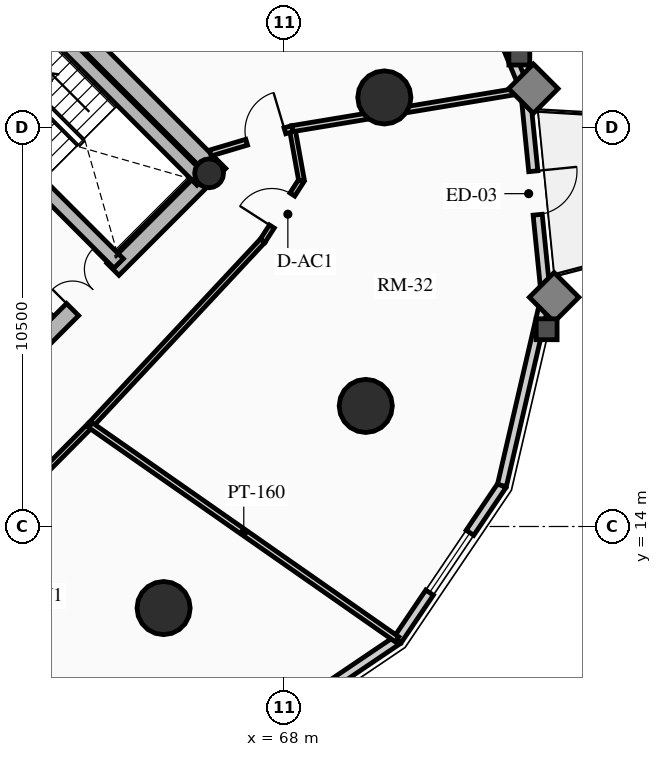
"""IFC4 building model, lengths in metres.
Left out: names, types, materials, properties, quantities, classifications, styles, units other than length and angle.
Written with IfcOpenShell. Run it as: python <this file> out.ifc"""

import sys

from ifc_helpers import new_model, si_unit, direction, frame, frame_2d, origin, origin_2d, place, context, subcontext, project, spatial, rectangle, circle, hollow_circle, extrude, source, transform, mapped, element, fill, save


model = new_model("IFC4")
c1 = context("Model", 3, precision=1e-05, world=origin(), true_north=direction((0.0, 1.0)))
c2 = subcontext(c1, "Body", "Model", "MODEL_VIEW")
j1 = project(units=[si_unit("LENGTHUNIT", "METRE"), si_unit("PLANEANGLEUNIT", "RADIAN")], contexts=[c1])
p1 = place(None, origin())
s1 = spatial("IfcSite", under=j1, at=p1, CompositionType="ELEMENT")
p2 = place(p1, origin())
s2 = spatial("IfcBuilding", under=s1, at=p2, CompositionType="ELEMENT")
p3 = place(p2, frame((0.0, 0.0, 119.62)))
s3 = spatial("IfcBuildingStorey", under=s2, at=p3, CompositionType="ELEMENT", Elevation=119.62)
p4 = place(p3, frame((66.303, 23.263, 0.0), z_axis=(0.0, 0.0, 1.0), x_axis=(-0.707106781187, 0.707106781187, 0.0)))
e1 = element("IfcWall", 1, at=p4, inside=s3, PredefinedType="SHEAR", context=c2, shape_type="SweptSolid", body=[
    extrude(rectangle(XDim=14.2, YDim=0.45, at=frame_2d((7.1, 0.0))), origin(), (0.0, 0.0, 1.0), 2.91),
])
p5 = place(p3, frame((58.578, 15.856, 0.0), z_axis=(0.0, 0.0, 1.0), x_axis=(0.707106781187, 0.707106781187, 0.0)))
e2 = element("IfcWall", 2, at=p5, inside=s3, PredefinedType="SHEAR", context=c2, shape_type="SweptSolid", body=[
    extrude(rectangle(XDim=10.7, YDim=0.45, at=frame_2d((5.35, 0.0))), origin(), (0.0, 0.0, 1.0), 2.91),
])
m1 = source(origin(), c2, "Body", "SweptSolid", [
    extrude(rectangle(XDim=1.5, YDim=2.02, at=frame_2d((0.75, 1.01))), frame((0.0, 0.235, 0.0), z_axis=(0.0, -1.0, 0.0), x_axis=(1.0, 0.0, 0.0)), (0.0, 0.0, 1.0), 0.47),
])
p6 = place(p5, frame((5.45, 0.0, 0.0)))
e3 = element("IfcOpeningElement", 3, at=p6, cuts=e2, PredefinedType="OPENING", context=c2, shape_type="MappedRepresentation", body=[
    mapped(m1, transform((0.0, 0.0, 0.0), x_axis=(1.0, 0.0, 0.0), y_axis=(0.0, 1.0, 0.0), z_axis=(0.0, 0.0, 1.0), scale=1.0)),
])
p7 = place(p3, frame((63.645, 20.922, 0.0), z_axis=(0.0, 0.0, 1.0), x_axis=(-0.707106781187, 0.707106781187, 0.0)))
e4 = element("IfcWall", 4, at=p7, inside=s3, PredefinedType="SHEAR", context=c2, shape_type="SweptSolid", body=[
    extrude(rectangle(XDim=13.75, YDim=0.35, at=frame_2d((6.875, 0.0))), origin(), (0.0, 0.0, 1.0), 2.91),
])
m2 = source(origin(), c2, "Body", "SweptSolid", [
    extrude(rectangle(XDim=1.1, YDim=2.015, at=frame_2d((0.55, 1.007))), frame((0.0, 0.185, 0.0), z_axis=(0.0, -1.0, 0.0), x_axis=(1.0, 0.0, 0.0)), (0.0, 0.0, 1.0), 0.37),
])
p8 = place(p7, frame((10.0, 0.0, 0.0)))
e5 = element("IfcOpeningElement", 5, at=p8, cuts=e4, PredefinedType="OPENING", context=c2, shape_type="MappedRepresentation", body=[
    mapped(m2, transform((0.0, 0.0, 0.0), x_axis=(1.0, 0.0, 0.0), y_axis=(0.0, 1.0, 0.0), z_axis=(0.0, 0.0, 1.0), scale=1.0)),
])
p9 = place(p7, frame((12.0, 0.0, 0.0)))
e6 = element("IfcOpeningElement", 6, at=p9, cuts=e4, PredefinedType="OPENING", context=c2, shape_type="MappedRepresentation", body=[
    mapped(m2, transform((0.0, 0.0, 0.0), x_axis=(1.0, 0.0, 0.0), y_axis=(0.0, 1.0, 0.0), z_axis=(0.0, 0.0, 1.0), scale=1.0)),
])
m3 = source(origin(), c2, "Body", "SweptSolid", [
    extrude(rectangle(XDim=1.15, YDim=2.02, at=frame_2d((0.575, 1.01))), frame((0.0, 0.185, 0.0), z_axis=(0.0, -1.0, 0.0), x_axis=(1.0, 0.0, 0.0)), (0.0, 0.0, 1.0), 0.37),
])
p10 = place(p7, frame((5.305, 0.0, 0.0)))
e7 = element("IfcOpeningElement", 7, at=p10, cuts=e4, PredefinedType="OPENING", context=c2, shape_type="MappedRepresentation", body=[
    mapped(m3, transform((0.0, 0.0, 0.0), x_axis=(1.0, 0.0, 0.0), y_axis=(0.0, 1.0, 0.0), z_axis=(0.0, 0.0, 1.0), scale=1.0)),
])
p11 = place(p3, frame((65.83, 23.107, 0.0), z_axis=(0.0, 0.0, 1.0), x_axis=(-0.707088616009, 0.707124945897, 0.0)))
e8 = element("IfcWall", 8, at=p11, inside=s3, PredefinedType="SHEAR", context=c2, shape_type="SweptSolid", body=[
    extrude(rectangle(XDim=6.72, YDim=0.35, at=frame_2d((3.36, 0.0))), origin(), (0.0, 0.0, 1.0), 2.91),
])
p12 = place(p3, frame((66.024, 23.294, 0.0), z_axis=(0.0, 0.0, 1.0), x_axis=(0.707106781187, 0.707106781187, 0.0)))
e9 = element("IfcColumn", 9, at=p12, inside=s3, PredefinedType="COLUMN", context=c2, shape_type="SweptSolid", body=[
    extrude(hollow_circle(Radius=0.38, WallThickness=0.032, at=origin_2d()), origin(), (0.0, 0.0, 1.0), 2.91),
])
for number, where, z_axis, x_axis in (
    (10, (64.827, 11.854, 0.0), (0.0, 0.0, 1.0), (1.0, 0.0, 0.0)),
    (11, (70.146, 17.173, 0.0), (0.0, 0.0, 1.0), (1.0, 0.0, 0.0)),
    (12, (70.635, 25.291, 0.0), (0.0, 0.0, 1.0), (1.0, 0.0, 0.0)),
):
    element("IfcColumn", number, at=place(p3, frame(where, z_axis=z_axis, x_axis=x_axis)), inside=s3, PredefinedType="USERDEFINED", context=c2, shape_type="SweptSolid", body=[
        extrude(circle(Radius=0.7, at=origin_2d()), origin(), (0.0, 0.0, 1.0), 2.91),
    ])
p13 = place(p3, frame((70.985, 11.015, 0.0), z_axis=(0.0, 0.0, 1.0), x_axis=(-0.828781148131, -0.559572880421, 0.0)))
e13 = element("IfcWall", 13, at=p13, inside=s3, PredefinedType="SOLIDWALL", context=c2, shape_type="SweptSolid", body=[
    extrude(rectangle(XDim=4.905, YDim=0.24, at=frame_2d((2.452, 0.0))), origin(), (0.0, 0.0, 1.0), 2.179),
])
p14 = place(p3, frame((73.729, 15.08, 0.0), z_axis=(0.0, 0.0, 1.0), x_axis=(-0.559572880421, -0.828781148131, 0.0)))
e14 = element("IfcWall", 14, at=p14, inside=s3, PredefinedType="SOLIDWALL", context=c2, shape_type="SweptSolid", body=[
    extrude(rectangle(XDim=4.905, YDim=0.24, at=frame_2d((2.452, 0.0))), origin(), (0.0, 0.0, 1.0), 2.179),
])
m4 = source(origin(), c2, "Body", "SweptSolid", [
    extrude(rectangle(XDim=1.9, YDim=1.35, at=frame_2d((0.95, 0.675))), frame((0.0, 0.13, 0.0), z_axis=(0.0, -1.0, 0.0), x_axis=(1.0, 0.0, 0.0)), (0.0, 0.0, 1.0), 0.26),
])
p15 = place(p14, frame((1.502, 0.0, 0.65)))
e15 = element("IfcOpeningElement", 15, at=p15, cuts=e14, PredefinedType="OPENING", context=c2, shape_type="MappedRepresentation", body=[
    mapped(m4, transform((0.0, 0.0, 0.0), x_axis=(1.0, 0.0, 0.0), y_axis=(0.0, 1.0, 0.0), z_axis=(0.0, 0.0, 1.0), scale=1.0)),
])
p16 = place(p3, frame((74.885, 20.067, 0.0), z_axis=(0.0, 0.0, 1.0), x_axis=(-0.225834725257, -0.974165631126, 0.0)))
e16 = element("IfcWall", 16, at=p16, inside=s3, PredefinedType="SOLIDWALL", context=c2, shape_type="SweptSolid", body=[
    extrude(rectangle(XDim=5.119, YDim=0.24, at=frame_2d((2.56, 0.0))), origin(), (0.0, 0.0, 1.0), 2.179),
])
p17 = place(p3, frame((74.339, 25.487, 0.0), z_axis=(0.0, 0.0, 1.0), x_axis=(0.10015591906, -0.994971754311, 0.0)))
e17 = element("IfcWall", 17, at=p17, inside=s3, PredefinedType="SOLIDWALL", context=c2, shape_type="SweptSolid", body=[
    extrude(rectangle(XDim=5.448, YDim=0.24, at=frame_2d((2.724, 0.0))), origin(), (0.0, 0.0, 1.0), 2.179),
])
m5 = source(origin(), c2, "Body", "SweptSolid", [
    extrude(rectangle(XDim=1.15, YDim=2.005, at=frame_2d((0.575, 1.002))), frame((0.0, 0.13, 0.0), z_axis=(0.0, -1.0, 0.0), x_axis=(1.0, 0.0, 0.0)), (0.0, 0.0, 1.0), 0.26),
])
p18 = place(p17, frame((2.149, 0.0, 0.0)))
e18 = element("IfcOpeningElement", 18, at=p18, cuts=e17, PredefinedType="OPENING", context=c2, shape_type="MappedRepresentation", body=[
    mapped(m5, transform((0.0, 0.0, 0.0), x_axis=(1.0, 0.0, 0.0), y_axis=(0.0, 1.0, 0.0), z_axis=(0.0, 0.0, 1.0), scale=1.0)),
])
p19 = place(p3, frame((72.145, 30.811, 0.0), z_axis=(0.0, 0.0, 1.0), x_axis=(0.381027003055, -0.924563909604, 0.0)))
e19 = element("IfcWall", 19, at=p19, inside=s3, PredefinedType="SOLIDWALL", context=c2, shape_type="SweptSolid", body=[
    extrude(rectangle(XDim=5.758, YDim=0.24, at=frame_2d((2.879, 0.0))), origin(), (0.0, 0.0, 1.0), 2.179),
])
p20 = place(p3, frame((60.562, 14.31, 0.0), z_axis=(0.0, 0.0, 1.0), x_axis=(0.704566236161, 0.709638230975, 0.0)))
e20 = element("IfcWall", 20, at=p20, inside=s3, PredefinedType="PARTITIONING", context=c2, shape_type="SweptSolid", body=[
    extrude(rectangle(XDim=3.321, YDim=0.15, at=frame_2d((1.661, 0.0))), origin(), (0.0, 0.0, 1.0), 2.225),
])
p21 = place(p3, frame((62.903, 16.667, 0.0), z_axis=(0.0, 0.0, 1.0), x_axis=(0.682371947497, 0.731005147225, 0.0)))
e21 = element("IfcWall", 21, at=p21, inside=s3, PredefinedType="PARTITIONING", context=c2, shape_type="SweptSolid", body=[
    extrude(rectangle(XDim=6.642, YDim=0.15, at=frame_2d((3.321, 0.0))), origin(), (0.0, 0.0, 1.0), 2.225),
])
p22 = place(p3, frame((67.435, 21.521, 0.0), z_axis=(0.0, 0.0, 1.0), x_axis=(0.540777197838, 0.841165870859, 0.0)))
e22 = element("IfcWall", 22, at=p22, inside=s3, PredefinedType="PARTITIONING", context=c2, shape_type="SweptSolid", body=[
    extrude(rectangle(XDim=1.888, YDim=0.15, at=frame_2d((0.944, 0.0))), origin(), (0.0, 0.0, 1.0), 2.225),
])
m6 = source(origin(), c2, "Body", "SweptSolid", [
    extrude(rectangle(XDim=1.0, YDim=2.015, at=frame_2d((0.5, 1.007))), frame((0.0, 0.085, 0.0), z_axis=(0.0, -1.0, 0.0), x_axis=(1.0, 0.0, 0.0)), (0.0, 0.0, 1.0), 0.17),
])
p23 = place(p22, frame((0.444, 0.0, 0.0)))
e23 = element("IfcOpeningElement", 23, at=p23, cuts=e22, PredefinedType="OPENING", context=c2, shape_type="MappedRepresentation", body=[
    mapped(m6, transform((0.0, 0.0, 0.0), x_axis=(1.0, 0.0, 0.0), y_axis=(0.0, 1.0, 0.0), z_axis=(0.0, 0.0, 1.0), scale=1.0)),
])
p24 = place(p3, frame((68.456, 23.11, 0.0), z_axis=(0.0, 0.0, 1.0), x_axis=(-0.1772522795, 0.984165448191, 0.0)))
e24 = element("IfcWall", 24, at=p24, inside=s3, PredefinedType="PARTITIONING", context=c2, shape_type="SweptSolid", body=[
    extrude(rectangle(XDim=1.382, YDim=0.15, at=frame_2d((0.691, 0.0))), origin(), (0.0, 0.0, 1.0), 2.225),
])
p25 = place(p3, frame((62.903, 16.667, 0.0), z_axis=(0.0, 0.0, 1.0), x_axis=(0.819735047612, -0.572742919395, 0.0)))
e25 = element("IfcWall", 25, at=p25, inside=s3, PredefinedType="PARTITIONING", context=c2, shape_type="SweptSolid", body=[
    extrude(rectangle(XDim=9.842, YDim=0.16, at=frame_2d((4.921, 0.0))), origin(), (0.0, 0.0, 1.0), 2.179),
])
p26 = place(p3, frame((68.211, 24.469, 0.0), z_axis=(0.0, 0.0, 1.0), x_axis=(0.986479033329, 0.163887512651, 0.0)))
e26 = element("IfcWall", 26, at=p26, inside=s3, PredefinedType="PARTITIONING", context=c2, shape_type="SweptSolid", body=[
    extrude(rectangle(XDim=6.193, YDim=0.16, at=frame_2d((3.096, 0.0))), origin(), (0.0, 0.0, 1.0), 2.179),
])
p27 = place(p3, frame((66.056, 23.828, 0.0), z_axis=(0.0, 0.0, 1.0), x_axis=(0.958475403544, 0.285175210708, 0.0)))
e27 = element("IfcWall", 27, at=p27, inside=s3, PredefinedType="PARTITIONING", context=c2, shape_type="SweptSolid", body=[
    extrude(rectangle(XDim=2.248, YDim=0.16, at=frame_2d((1.124, 0.0))), origin(), (0.0, 0.0, 1.0), 2.225),
])
m7 = source(origin(), c2, "Body", "SweptSolid", [
    extrude(rectangle(XDim=1.05, YDim=2.015, at=frame_2d((0.525, 1.007))), frame((0.0, 0.09, 0.0), z_axis=(0.0, -1.0, 0.0), x_axis=(1.0, 0.0, 0.0)), (0.0, 0.0, 1.0), 0.18),
])
p28 = place(p27, frame((0.998, 0.0, 0.0)))
e28 = element("IfcOpeningElement", 28, at=p28, cuts=e27, PredefinedType="OPENING", context=c2, shape_type="MappedRepresentation", body=[
    mapped(m7, transform((0.0, 0.0, 0.0), x_axis=(1.0, 0.0, 0.0), y_axis=(0.0, 1.0, 0.0), z_axis=(0.0, 0.0, 1.0), scale=1.0)),
])
p29 = place(p3, frame((59.008, 13.963, 0.0), z_axis=(0.0, 0.0, 1.0), x_axis=(0.393439207333, -0.919350635032, 0.0)))
e29 = element("IfcWall", 29, at=p29, inside=s3, PredefinedType="PARTITIONING", context=c2, shape_type="SweptSolid", body=[
    extrude(rectangle(XDim=7.427, YDim=0.125, at=frame_2d((3.713, 0.0))), origin(), (0.0, 0.0, 1.0), 2.179),
])
m8 = source(origin(), c2, "Body", "SweptSolid", [
    extrude(rectangle(XDim=0.9, YDim=2.005, at=frame_2d((0.45, 1.002))), frame((0.0, 0.073, 0.0), z_axis=(0.0, -1.0, 0.0), x_axis=(1.0, 0.0, 0.0)), (0.0, 0.0, 1.0), 0.145),
])
p30 = place(p29, frame((1.8, 0.0, 0.0)))
e30 = element("IfcOpeningElement", 30, at=p30, cuts=e29, PredefinedType="OPENING", context=c2, shape_type="MappedRepresentation", body=[
    mapped(m8, transform((0.0, 0.0, 0.0), x_axis=(1.0, 0.0, 0.0), y_axis=(0.0, 1.0, 0.0), z_axis=(0.0, 0.0, 1.0), scale=1.0)),
])
m9 = source(origin(), c2, "Body", "SweptSolid", [
    extrude(rectangle(XDim=1.9, YDim=1.35, at=frame_2d((0.95, 0.675))), frame((0.0, 0.03, 0.0), z_axis=(0.0, -1.0, 0.0), x_axis=(1.0, 0.0, 0.0)), (0.0, 0.0, 1.0), 0.06),
])
p31 = place(p15, origin())
e31 = element("IfcWindow", 31, at=p31, inside=s3, PartitioningType="DOUBLE_PANEL_VERTICAL", PredefinedType="WINDOW", context=c2, shape_type="MappedRepresentation", body=[
    mapped(m9, transform((0.0, 0.0, 0.0), x_axis=(1.0, 0.0, 0.0), y_axis=(0.0, 1.0, 0.0), z_axis=(0.0, 0.0, 1.0), scale=1.0)),
])
fill(e15, e31)
m10 = source(origin(), c2, "Body", "SweptSolid", [
    extrude(rectangle(XDim=1.15, YDim=2.005, at=frame_2d((0.575, 1.002))), frame((0.0, 0.025, 0.0), z_axis=(0.0, -1.0, 0.0), x_axis=(1.0, 0.0, 0.0)), (0.0, 0.0, 1.0), 0.05),
])
p32 = place(p18, origin())
e32 = element("IfcDoor", 32, at=p32, inside=s3, OperationType="SINGLE_SWING_LEFT", PredefinedType="DOOR", context=c2, shape_type="MappedRepresentation", body=[
    mapped(m10, transform((0.0, 0.0, 0.0), x_axis=(1.0, 0.0, 0.0), y_axis=(0.0, 1.0, 0.0), z_axis=(0.0, 0.0, 1.0), scale=1.0)),
])
fill(e18, e32)
m11 = source(origin(), c2, "Body", "SweptSolid", [
    extrude(rectangle(XDim=1.5, YDim=2.02, at=frame_2d((0.75, 1.01))), frame((0.0, 0.025, 0.0), z_axis=(0.0, -1.0, 0.0), x_axis=(1.0, 0.0, 0.0)), (0.0, 0.0, 1.0), 0.05),
])
p33 = place(p6, origin())
e33 = element("IfcDoor", 33, at=p33, inside=s3, OperationType="DOUBLE_DOOR_SINGLE_SWING", PredefinedType="DOOR", context=c2, shape_type="MappedRepresentation", body=[
    mapped(m11, transform((0.0, 0.0, 0.0), x_axis=(1.0, 0.0, 0.0), y_axis=(0.0, 1.0, 0.0), z_axis=(0.0, 0.0, 1.0), scale=1.0)),
])
fill(e3, e33)
m12 = source(origin(), c2, "Body", "SweptSolid", [
    extrude(rectangle(XDim=1.05, YDim=2.015, at=frame_2d((0.525, 1.007))), frame((0.0, 0.025, 0.0), z_axis=(0.0, -1.0, 0.0), x_axis=(1.0, 0.0, 0.0)), (0.0, 0.0, 1.0), 0.05),
])
p34 = place(p28, origin())
e34 = element("IfcDoor", 34, at=p34, inside=s3, OperationType="SINGLE_SWING_RIGHT", PredefinedType="DOOR", context=c2, shape_type="MappedRepresentation", body=[
    mapped(m12, transform((0.0, 0.0, 0.0), x_axis=(1.0, 0.0, 0.0), y_axis=(0.0, 1.0, 0.0), z_axis=(0.0, 0.0, 1.0), scale=1.0)),
])
fill(e28, e34)
m13 = source(origin(), c2, "Body", "SweptSolid", [
    extrude(rectangle(XDim=1.0, YDim=2.015, at=frame_2d((0.5, 1.007))), frame((0.0, 0.025, 0.0), z_axis=(0.0, -1.0, 0.0), x_axis=(1.0, 0.0, 0.0)), (0.0, 0.0, 1.0), 0.05),
])
p35 = place(p23, origin())
e35 = element("IfcDoor", 35, at=p35, inside=s3, OperationType="SINGLE_SWING_LEFT", PredefinedType="DOOR", context=c2, shape_type="MappedRepresentation", body=[
    mapped(m13, transform((0.0, 0.0, 0.0), x_axis=(1.0, 0.0, 0.0), y_axis=(0.0, 1.0, 0.0), z_axis=(0.0, 0.0, 1.0), scale=1.0)),
])
fill(e23, e35)
save(model, sys.argv[1])
